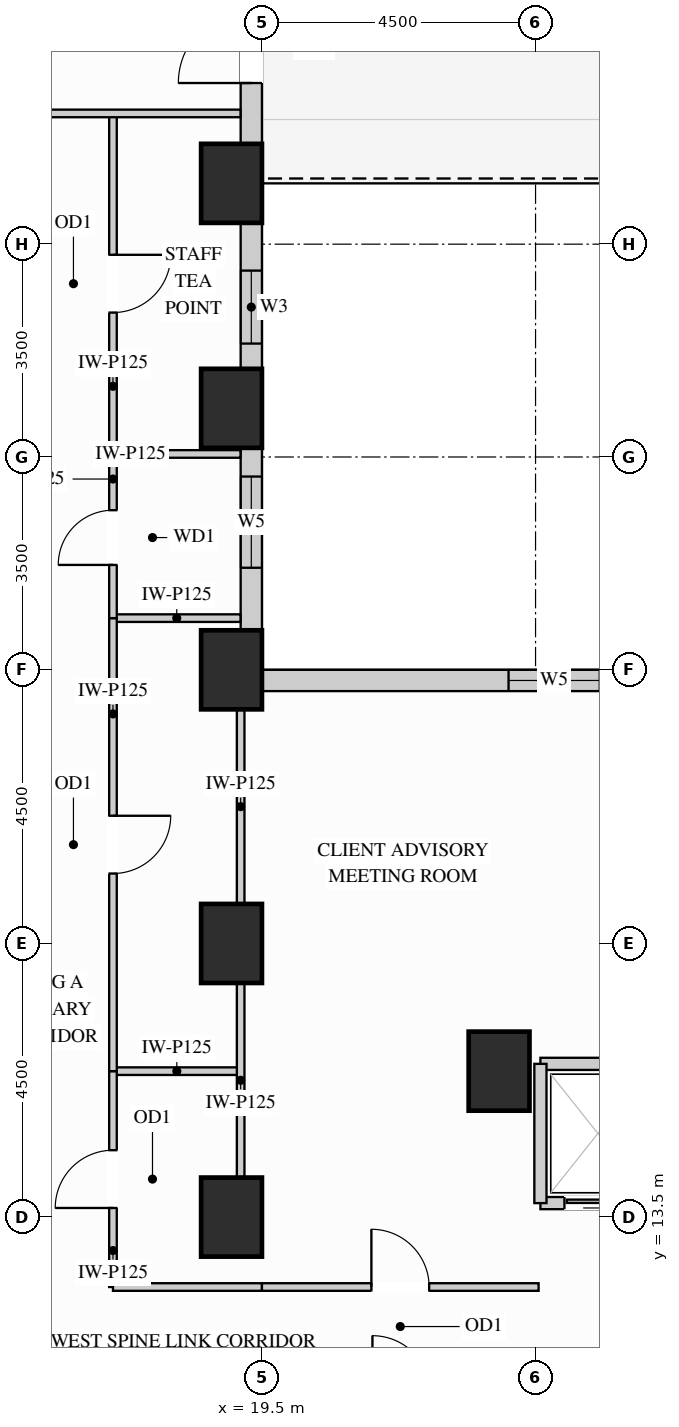
"""IFC4 building model, lengths in metres.
Left out: names, types, materials, properties, quantities, classifications, styles, units other than length and angle.
Written with IfcOpenShell. Run it as: python <this file> out.ifc"""

import sys

from ifc_helpers import new_model, si_unit, direction, frame, frame_2d, origin, origin_2d, place, context, subcontext, project, spatial, rectangle, extrude, source, transform, mapped, element, fill, save


model = new_model("IFC4")
c1 = context("Model", 3, precision=1e-05, world=origin(), true_north=direction((0.0, 1.0)))
c2 = subcontext(c1, "Body", "Model", "MODEL_VIEW")
j1 = project(units=[si_unit("LENGTHUNIT", "METRE"), si_unit("PLANEANGLEUNIT", "RADIAN")], contexts=[c1])
p1 = place(None, origin())
s1 = spatial("IfcSite", under=j1, at=p1, CompositionType="ELEMENT")
p2 = place(p1, origin())
s2 = spatial("IfcBuilding", under=s1, at=p2, CompositionType="ELEMENT")
p3 = place(p2, frame((0.0, 0.0, 40.5)))
s3 = spatial("IfcBuildingStorey", under=s2, at=p3, CompositionType="ELEMENT", Elevation=40.5)
m1 = source(origin(), c2, "Body", "SweptSolid", [
    extrude(rectangle(XDim=1.0, YDim=1.3, at=origin_2d()), origin(), (0.0, 0.0, 1.0), 3.38),
])
for number, where, z_axis, x_axis in (
    (1, (19.0, 13.5, 0.0), (0.0, 0.0, 1.0), (1.0, 0.0, 0.0)),
    (2, (19.0, 18.0, 0.0), (0.0, 0.0, 1.0), (1.0, 0.0, 0.0)),
    (3, (19.0, 22.5, 0.0), (0.0, 0.0, 1.0), (1.0, 0.0, 0.0)),
    (4, (19.0, 26.8, 0.0), (0.0, 0.0, 1.0), (1.0, 0.0, 0.0)),
    (5, (19.0, 30.5, 0.0), (0.0, 0.0, 1.0), (1.0, 0.0, 0.0)),
    (6, (23.4, 15.9, 0.0), (0.0, 0.0, 1.0), (1.0, 0.0, 0.0)),
):
    element("IfcColumn", number, at=place(p3, frame(where, z_axis=z_axis, x_axis=x_axis)), inside=s3, PredefinedType="COLUMN", context=c2, shape_type="MappedRepresentation", body=[
        mapped(m1, transform((0.0, 0.0, 0.0), x_axis=(1.0, 0.0, 0.0), y_axis=(0.0, 1.0, 0.0), z_axis=(0.0, 0.0, 1.0))),
    ])
p4 = place(p3, frame((34.352, 22.325, 0.0), z_axis=(0.0, 0.0, 1.0), x_axis=(-1.0, 0.0, 0.0)))
e7 = element("IfcWall", 7, at=p4, inside=s3, PredefinedType="SOLIDWALL", context=c2, shape_type="SweptSolid", body=[
    extrude(rectangle(XDim=14.854, YDim=0.35, at=frame_2d((7.427, 0.0))), origin(), (0.0, 0.0, 1.0), 3.365),
])
p5 = place(p4, frame((4.058, 0.0, 0.78)))
e8 = element("IfcOpeningElement", 8, at=p5, cuts=e7, PredefinedType="OPENING", context=c2, shape_type="SweptSolid", body=[
    extrude(rectangle(XDim=1.5, YDim=2.0, at=frame_2d((0.75, 1.0))), frame((0.0, 0.185, 0.0), z_axis=(0.0, -1.0, 0.0), x_axis=(1.0, 0.0, 0.0)), (0.0, 0.0, 1.0), 0.37),
])
p6 = place(p4, frame((9.296, 0.0, 0.78)))
e9 = element("IfcOpeningElement", 9, at=p6, cuts=e7, PredefinedType="OPENING", context=c2, shape_type="SweptSolid", body=[
    extrude(rectangle(XDim=1.5, YDim=2.0, at=frame_2d((0.75, 1.0))), frame((0.0, 0.185, 0.0), z_axis=(0.0, -1.0, 0.0), x_axis=(1.0, 0.0, 0.0)), (0.0, 0.0, 1.0), 0.37),
])
p7 = place(p3, frame((19.325, 23.148, 0.0), z_axis=(0.0, 0.0, 1.0), x_axis=(0.0, 1.0, 0.0)))
e10 = element("IfcWall", 10, at=p7, inside=s3, PredefinedType="SOLIDWALL", context=c2, shape_type="SweptSolid", body=[
    extrude(rectangle(XDim=3.004, YDim=0.35, at=frame_2d((1.502, 0.0))), origin(), (0.0, 0.0, 1.0), 2.51),
])
p8 = place(p7, frame((1.031, 0.0, 0.78)))
e11 = element("IfcOpeningElement", 11, at=p8, cuts=e10, PredefinedType="OPENING", context=c2, shape_type="SweptSolid", body=[
    extrude(rectangle(XDim=1.5, YDim=1.55, at=frame_2d((0.75, 0.775))), frame((0.0, 0.185, 0.0), z_axis=(0.0, -1.0, 0.0), x_axis=(1.0, 0.0, 0.0)), (0.0, 0.0, 1.0), 0.37),
])
p9 = place(p3, frame((19.325, 27.448, 0.0), z_axis=(0.0, 0.0, 1.0), x_axis=(0.0, 1.0, 0.0)))
e12 = element("IfcWall", 12, at=p9, inside=s3, PredefinedType="SOLIDWALL", context=c2, shape_type="SweptSolid", body=[
    extrude(rectangle(XDim=2.404, YDim=0.35, at=frame_2d((1.202, 0.0))), origin(), (0.0, 0.0, 1.0), 2.51),
])
p10 = place(p9, frame((0.417, 0.0, 0.78)))
e13 = element("IfcOpeningElement", 13, at=p10, cuts=e12, PredefinedType="OPENING", context=c2, shape_type="SweptSolid", body=[
    extrude(rectangle(XDim=1.2, YDim=1.55, at=frame_2d((0.6, 0.775))), frame((0.0, 0.185, 0.0), z_axis=(0.0, -1.0, 0.0), x_axis=(1.0, 0.0, 0.0)), (0.0, 0.0, 1.0), 0.37),
])
p11 = place(p3, frame((19.325, 31.148, 0.0), z_axis=(0.0, 0.0, 1.0), x_axis=(0.0, 1.0, 0.0)))
e14 = element("IfcWall", 14, at=p11, inside=s3, PredefinedType="SOLIDWALL", context=c2, shape_type="SweptSolid", body=[
    extrude(rectangle(XDim=3.204, YDim=0.35, at=frame_2d((1.602, 0.0))), origin(), (0.0, 0.0, 1.0), 2.51),
])
p12 = place(p11, frame((1.002, 0.0, 0.0)))
e15 = element("IfcOpeningElement", 15, at=p12, cuts=e14, PredefinedType="OPENING", context=c2, shape_type="SweptSolid", body=[
    extrude(rectangle(XDim=1.2, YDim=2.15, at=frame_2d((0.6, 1.075))), frame((0.0, 0.185, 0.0), z_axis=(0.0, -1.0, 0.0), x_axis=(1.0, 0.0, 0.0)), (0.0, 0.0, 1.0), 0.37),
])
m2 = source(origin(), c2, "Body", "SweptSolid", [
    extrude(rectangle(XDim=2.1, YDim=0.125, at=frame_2d((1.05, 0.0))), origin(), (0.0, 0.0, 1.0), 3.365),
])
p13 = place(p3, frame((17.05, 15.9, 0.0), z_axis=(0.0, 0.0, 1.0), x_axis=(1.0, 0.0, 0.0)))
e16 = element("IfcWall", 16, at=p13, inside=s3, PredefinedType="PARTITIONING", context=c2, shape_type="MappedRepresentation", body=[
    mapped(m2, transform((0.0, 0.0, 0.0), x_axis=(1.0, 0.0, 0.0), y_axis=(0.0, 1.0, 0.0), z_axis=(0.0, 0.0, 1.0))),
])
m3 = source(origin(), c2, "Body", "SweptSolid", [
    extrude(rectangle(XDim=2.098, YDim=0.125, at=frame_2d((1.049, 0.0))), origin(), (0.0, 0.0, 1.0), 3.365),
])
for number, where, z_axis, x_axis in (
    (17, (17.05, 23.35, 0.0), (0.0, 0.0, 1.0), (1.0, 0.0, 0.0)),
    (18, (17.05, 26.05, 0.0), (0.0, 0.0, 1.0), (1.0, 0.0, 0.0)),
):
    element("IfcWall", number, at=place(p3, frame(where, z_axis=z_axis, x_axis=x_axis)), inside=s3, PredefinedType="PARTITIONING", context=c2, shape_type="MappedRepresentation", body=[
        mapped(m3, transform((0.0, 0.0, 0.0), x_axis=(1.0, 0.0, 0.0), y_axis=(0.0, 1.0, 0.0), z_axis=(0.0, 0.0, 1.0))),
    ])
m4 = source(origin(), c2, "Body", "SweptSolid", [
    extrude(rectangle(XDim=3.18, YDim=0.125, at=frame_2d((1.59, 0.0))), origin(), (0.0, 0.0, 1.0), 2.67),
])
for number, where, z_axis, x_axis in (
    (19, (19.15, 14.16, 0.0), (0.0, 0.0, 1.0), (0.0, 1.0, 0.0)),
    (20, (19.15, 18.66, 0.0), (0.0, 0.0, 1.0), (0.0, 1.0, 0.0)),
):
    element("IfcWall", number, at=place(p3, frame(where, z_axis=z_axis, x_axis=x_axis)), inside=s3, PredefinedType="PARTITIONING", context=c2, shape_type="MappedRepresentation", body=[
        mapped(m4, transform((0.0, 0.0, 0.0), x_axis=(1.0, 0.0, 0.0), y_axis=(0.0, 1.0, 0.0), z_axis=(0.0, 0.0, 1.0))),
    ])
p14 = place(p3, frame((17.05, 12.35, 0.0), z_axis=(0.0, 0.0, 1.0), x_axis=(0.0, 1.0, 0.0)))
e21 = element("IfcWall", 21, at=p14, inside=s3, PredefinedType="PARTITIONING", context=c2, shape_type="SweptSolid", body=[
    extrude(rectangle(XDim=3.55, YDim=0.125, at=frame_2d((1.775, 0.0))), origin(), (0.0, 0.0, 1.0), 3.365),
])
p15 = place(p14, frame((1.3, 0.0, 0.0)))
e22 = element("IfcOpeningElement", 22, at=p15, cuts=e21, PredefinedType="OPENING", context=c2, shape_type="SweptSolid", body=[
    extrude(rectangle(XDim=0.95, YDim=2.15, at=frame_2d((0.475, 1.075))), frame((0.0, 0.073, 0.0), z_axis=(0.0, -1.0, 0.0), x_axis=(1.0, 0.0, 0.0)), (0.0, 0.0, 1.0), 0.145),
])
p16 = place(p3, frame((17.05, 15.9, 0.0), z_axis=(0.0, 0.0, 1.0), x_axis=(0.0, 1.0, 0.0)))
e23 = element("IfcWall", 23, at=p16, inside=s3, PredefinedType="PARTITIONING", context=c2, shape_type="SweptSolid", body=[
    extrude(rectangle(XDim=7.45, YDim=0.125, at=frame_2d((3.725, 0.0))), origin(), (0.0, 0.0, 1.0), 3.365),
])
p17 = place(p16, frame((3.25, 0.0, 0.0)))
e24 = element("IfcOpeningElement", 24, at=p17, cuts=e23, PredefinedType="OPENING", context=c2, shape_type="SweptSolid", body=[
    extrude(rectangle(XDim=0.95, YDim=2.15, at=frame_2d((0.475, 1.075))), frame((0.0, 0.073, 0.0), z_axis=(0.0, -1.0, 0.0), x_axis=(1.0, 0.0, 0.0)), (0.0, 0.0, 1.0), 0.145),
])
p18 = place(p3, frame((17.05, 26.05, 0.0), z_axis=(0.0, 0.0, 1.0), x_axis=(0.0, 1.0, 0.0)))
e25 = element("IfcWall", 25, at=p18, inside=s3, PredefinedType="PARTITIONING", context=c2, shape_type="SweptSolid", body=[
    extrude(rectangle(XDim=5.6, YDim=0.125, at=frame_2d((2.8, 0.0))), origin(), (0.0, 0.0, 1.0), 3.365),
])
p19 = place(p18, frame((2.325, 0.0, 0.0)))
e26 = element("IfcOpeningElement", 26, at=p19, cuts=e25, PredefinedType="OPENING", context=c2, shape_type="SweptSolid", body=[
    extrude(rectangle(XDim=0.95, YDim=2.15, at=frame_2d((0.475, 1.075))), frame((0.0, 0.073, 0.0), z_axis=(0.0, -1.0, 0.0), x_axis=(1.0, 0.0, 0.0)), (0.0, 0.0, 1.0), 0.145),
])
p20 = place(p3, frame((17.05, 23.35, 0.0), z_axis=(0.0, 0.0, 1.0), x_axis=(0.0, 1.0, 0.0)))
e27 = element("IfcWall", 27, at=p20, inside=s3, PredefinedType="PARTITIONING", context=c2, shape_type="SweptSolid", body=[
    extrude(rectangle(XDim=2.7, YDim=0.125, at=frame_2d((1.35, 0.0))), origin(), (0.0, 0.0, 1.0), 3.365),
])
p21 = place(p20, frame((0.875, 0.0, 0.0)))
e28 = element("IfcOpeningElement", 28, at=p21, cuts=e27, PredefinedType="OPENING", context=c2, shape_type="SweptSolid", body=[
    extrude(rectangle(XDim=0.9, YDim=2.15, at=frame_2d((0.45, 1.075))), frame((0.0, 0.073, 0.0), z_axis=(0.0, -1.0, 0.0), x_axis=(1.0, 0.0, 0.0)), (0.0, 0.0, 1.0), 0.145),
])
m5 = source(origin(), c2, "Body", "SweptSolid", [
    extrude(rectangle(XDim=5.798, YDim=0.125, at=frame_2d((2.899, 0.0))), origin(), (0.0, 0.0, 1.0), 2.828),
])
p22 = place(p3, frame((13.35, 31.65, 0.0), z_axis=(0.0, 0.0, 1.0), x_axis=(1.0, 0.0, 0.0)))
e29 = element("IfcWall", 29, at=p22, inside=s3, PredefinedType="PARTITIONING", context=c2, shape_type="MappedRepresentation", body=[
    mapped(m5, transform((0.0, 0.0, 0.0), x_axis=(1.0, 0.0, 0.0), y_axis=(0.0, 1.0, 0.0), z_axis=(0.0, 0.0, 1.0))),
])
m6 = source(origin(), c2, "Body", "SweptSolid", [
    extrude(rectangle(XDim=2.45, YDim=0.125, at=frame_2d((1.225, 0.0))), origin(), (0.0, 0.0, 1.0), 3.365),
])
p23 = place(p3, frame((17.05, 12.35, 0.0), z_axis=(0.0, 0.0, 1.0), x_axis=(1.0, 0.0, 0.0)))
e30 = element("IfcWall", 30, at=p23, inside=s3, PredefinedType="PARTITIONING", context=c2, shape_type="MappedRepresentation", body=[
    mapped(m6, transform((0.0, 0.0, 0.0), x_axis=(1.0, 0.0, 0.0), y_axis=(0.0, 1.0, 0.0), z_axis=(0.0, 0.0, 1.0))),
])
p24 = place(p3, frame((19.5, 12.35, 0.0), z_axis=(0.0, 0.0, 1.0), x_axis=(1.0, 0.0, 0.0)))
e31 = element("IfcWall", 31, at=p24, inside=s3, PredefinedType="PARTITIONING", context=c2, shape_type="SweptSolid", body=[
    extrude(rectangle(XDim=4.55, YDim=0.125, at=frame_2d((2.275, 0.0))), origin(), (0.0, 0.0, 1.0), 3.365),
])
p25 = place(p24, frame((1.8, 0.0, 0.0)))
e32 = element("IfcOpeningElement", 32, at=p25, cuts=e31, PredefinedType="OPENING", context=c2, shape_type="SweptSolid", body=[
    extrude(rectangle(XDim=0.95, YDim=2.15, at=frame_2d((0.475, 1.075))), frame((0.0, 0.073, 0.0), z_axis=(0.0, -1.0, 0.0), x_axis=(1.0, 0.0, 0.0)), (0.0, 0.0, 1.0), 0.145),
])
m7 = source(origin(), c2, "Body", "SweptSolid", [
    extrude(rectangle(XDim=1.89, YDim=0.2, at=frame_2d((0.945, 0.0))), origin(), (0.0, 0.0, 1.0), 2.67),
])
p26 = place(p3, frame((24.08, 16.02, 0.0), z_axis=(0.0, 0.0, 1.0), x_axis=(1.0, 0.0, 0.0)))
e33 = element("IfcWall", 33, at=p26, inside=s3, PredefinedType="PARTITIONING", context=c2, shape_type="MappedRepresentation", body=[
    mapped(m7, transform((0.0, 0.0, 0.0), x_axis=(1.0, 0.0, 0.0), y_axis=(0.0, 1.0, 0.0), z_axis=(0.0, 0.0, 1.0))),
])
p27 = place(p3, frame((24.08, 13.73, 0.0), z_axis=(0.0, 0.0, 1.0), x_axis=(1.0, 0.0, 0.0)))
e34 = element("IfcWall", 34, at=p27, inside=s3, PredefinedType="PARTITIONING", context=c2, shape_type="SweptSolid", body=[
    extrude(rectangle(XDim=1.89, YDim=0.2, at=frame_2d((0.945, 0.0))), origin(), (0.0, 0.0, 1.0), 2.446),
])
p28 = place(p27, frame((0.395, 0.0, 0.0)))
e35 = element("IfcOpeningElement", 35, at=p28, cuts=e34, PredefinedType="OPENING", context=c2, shape_type="SweptSolid", body=[
    extrude(rectangle(XDim=1.1, YDim=2.2, at=frame_2d((0.55, 1.1))), frame((0.0, 0.11, 0.0), z_axis=(0.0, -1.0, 0.0), x_axis=(1.0, 0.0, 0.0)), (0.0, 0.0, 1.0), 0.22),
])
m8 = source(origin(), c2, "Body", "SweptSolid", [
    extrude(rectangle(XDim=2.29, YDim=0.2, at=frame_2d((1.145, 0.0))), origin(), (0.0, 0.0, 1.0), 3.365),
])
p29 = place(p3, frame((24.08, 13.73, 0.0), z_axis=(0.0, 0.0, 1.0), x_axis=(0.0, 1.0, 0.0)))
e36 = element("IfcWall", 36, at=p29, inside=s3, PredefinedType="PARTITIONING", context=c2, shape_type="MappedRepresentation", body=[
    mapped(m8, transform((0.0, 0.0, 0.0), x_axis=(1.0, 0.0, 0.0), y_axis=(0.0, 1.0, 0.0), z_axis=(0.0, 0.0, 1.0))),
])
m9 = source(origin(), c2, "Body", "SweptSolid", [
    extrude(rectangle(XDim=1.2, YDim=2.15, at=frame_2d((0.6, 1.075))), frame((0.0, 0.025, 0.0), z_axis=(0.0, -1.0, 0.0), x_axis=(1.0, 0.0, 0.0)), (0.0, 0.0, 1.0), 0.05),
])
p30 = place(p12, frame((1.2, 0.0, 0.0), z_axis=(0.0, 0.0, 1.0), x_axis=(-1.0, 0.0, 0.0)))
e37 = element("IfcDoor", 37, at=p30, inside=s3, OperationType="SINGLE_SWING_LEFT", PredefinedType="DOOR", context=c2, shape_type="MappedRepresentation", body=[
    mapped(m9, transform((0.0, 0.0, 0.0), x_axis=(1.0, 0.0, 0.0), y_axis=(0.0, 1.0, 0.0), z_axis=(0.0, 0.0, 1.0))),
])
fill(e15, e37)
m10 = source(origin(), c2, "Body", "SweptSolid", [
    extrude(rectangle(XDim=1.1, YDim=2.2, at=frame_2d((0.55, 1.1))), frame((0.0, 0.025, 0.0), z_axis=(0.0, -1.0, 0.0), x_axis=(1.0, 0.0, 0.0)), (0.0, 0.0, 1.0), 0.05),
])
p31 = place(p28, origin())
e38 = element("IfcDoor", 38, at=p31, inside=s3, OperationType="SLIDING_TO_LEFT", PredefinedType="DOOR", context=c2, shape_type="MappedRepresentation", body=[
    mapped(m10, transform((0.0, 0.0, 0.0), x_axis=(1.0, 0.0, 0.0), y_axis=(0.0, 1.0, 0.0), z_axis=(0.0, 0.0, 1.0))),
])
fill(e35, e38)
m11 = source(origin(), c2, "Body", "SweptSolid", [
    extrude(rectangle(XDim=0.95, YDim=2.15, at=frame_2d((0.475, 1.075))), frame((0.0, 0.025, 0.0), z_axis=(0.0, -1.0, 0.0), x_axis=(1.0, 0.0, 0.0)), (0.0, 0.0, 1.0), 0.05),
])
p32 = place(p15, origin())
e39 = element("IfcDoor", 39, at=p32, inside=s3, OperationType="SINGLE_SWING_LEFT", PredefinedType="DOOR", context=c2, shape_type="MappedRepresentation", body=[
    mapped(m11, transform((0.0, 0.0, 0.0), x_axis=(1.0, 0.0, 0.0), y_axis=(0.0, 1.0, 0.0), z_axis=(0.0, 0.0, 1.0))),
])
fill(e22, e39)
p33 = place(p17, origin())
e40 = element("IfcDoor", 40, at=p33, inside=s3, OperationType="SINGLE_SWING_RIGHT", PredefinedType="DOOR", context=c2, shape_type="MappedRepresentation", body=[
    mapped(m11, transform((0.0, 0.0, 0.0), x_axis=(1.0, 0.0, 0.0), y_axis=(0.0, 1.0, 0.0), z_axis=(0.0, 0.0, 1.0))),
])
fill(e24, e40)
p34 = place(p19, origin())
e41 = element("IfcDoor", 41, at=p34, inside=s3, OperationType="SINGLE_SWING_RIGHT", PredefinedType="DOOR", context=c2, shape_type="MappedRepresentation", body=[
    mapped(m11, transform((0.0, 0.0, 0.0), x_axis=(1.0, 0.0, 0.0), y_axis=(0.0, 1.0, 0.0), z_axis=(0.0, 0.0, 1.0))),
])
fill(e26, e41)
p35 = place(p25, origin())
e42 = element("IfcDoor", 42, at=p35, inside=s3, OperationType="SINGLE_SWING_LEFT", PredefinedType="DOOR", context=c2, shape_type="MappedRepresentation", body=[
    mapped(m11, transform((0.0, 0.0, 0.0), x_axis=(1.0, 0.0, 0.0), y_axis=(0.0, 1.0, 0.0), z_axis=(0.0, 0.0, 1.0))),
])
fill(e32, e42)
m12 = source(origin(), c2, "Body", "SweptSolid", [
    extrude(rectangle(XDim=0.9, YDim=2.15, at=frame_2d((0.45, 1.075))), frame((0.0, 0.025, 0.0), z_axis=(0.0, -1.0, 0.0), x_axis=(1.0, 0.0, 0.0)), (0.0, 0.0, 1.0), 0.05),
])
p36 = place(p21, origin())
e43 = element("IfcDoor", 43, at=p36, inside=s3, OperationType="SINGLE_SWING_LEFT", PredefinedType="DOOR", context=c2, shape_type="MappedRepresentation", body=[
    mapped(m12, transform((0.0, 0.0, 0.0), x_axis=(1.0, 0.0, 0.0), y_axis=(0.0, 1.0, 0.0), z_axis=(0.0, 0.0, 1.0))),
])
fill(e28, e43)
m13 = source(origin(), c2, "Body", "SweptSolid", [
    extrude(rectangle(XDim=1.2, YDim=1.55, at=frame_2d((0.6, 0.775))), frame((0.0, 0.03, 0.0), z_axis=(0.0, -1.0, 0.0), x_axis=(1.0, 0.0, 0.0)), (0.0, 0.0, 1.0), 0.06),
])
p37 = place(p10, origin())
e44 = element("IfcWindow", 44, at=p37, inside=s3, PartitioningType="SINGLE_PANEL", PredefinedType="WINDOW", context=c2, shape_type="MappedRepresentation", body=[
    mapped(m13, transform((0.0, 0.0, 0.0), x_axis=(1.0, 0.0, 0.0), y_axis=(0.0, 1.0, 0.0), z_axis=(0.0, 0.0, 1.0))),
])
fill(e13, e44)
m14 = source(origin(), c2, "Body", "SweptSolid", [
    extrude(rectangle(XDim=1.5, YDim=2.0, at=frame_2d((0.75, 1.0))), frame((0.0, 0.03, 0.0), z_axis=(0.0, -1.0, 0.0), x_axis=(1.0, 0.0, 0.0)), (0.0, 0.0, 1.0), 0.06),
])
p38 = place(p6, origin())
e45 = element("IfcWindow", 45, at=p38, inside=s3, PartitioningType="SINGLE_PANEL", PredefinedType="WINDOW", context=c2, shape_type="MappedRepresentation", body=[
    mapped(m14, transform((0.0, 0.0, 0.0), x_axis=(1.0, 0.0, 0.0), y_axis=(0.0, 1.0, 0.0), z_axis=(0.0, 0.0, 1.0))),
])
fill(e9, e45)
m15 = source(origin(), c2, "Body", "SweptSolid", [
    extrude(rectangle(XDim=1.5, YDim=1.55, at=frame_2d((0.75, 0.775))), frame((0.0, 0.03, 0.0), z_axis=(0.0, -1.0, 0.0), x_axis=(1.0, 0.0, 0.0)), (0.0, 0.0, 1.0), 0.06),
])
p39 = place(p8, origin())
e46 = element("IfcWindow", 46, at=p39, inside=s3, PartitioningType="SINGLE_PANEL", PredefinedType="WINDOW", context=c2, shape_type="MappedRepresentation", body=[
    mapped(m15, transform((0.0, 0.0, 0.0), x_axis=(1.0, 0.0, 0.0), y_axis=(0.0, 1.0, 0.0), z_axis=(0.0, 0.0, 1.0))),
])
fill(e11, e46)
save(model, sys.argv[1])
